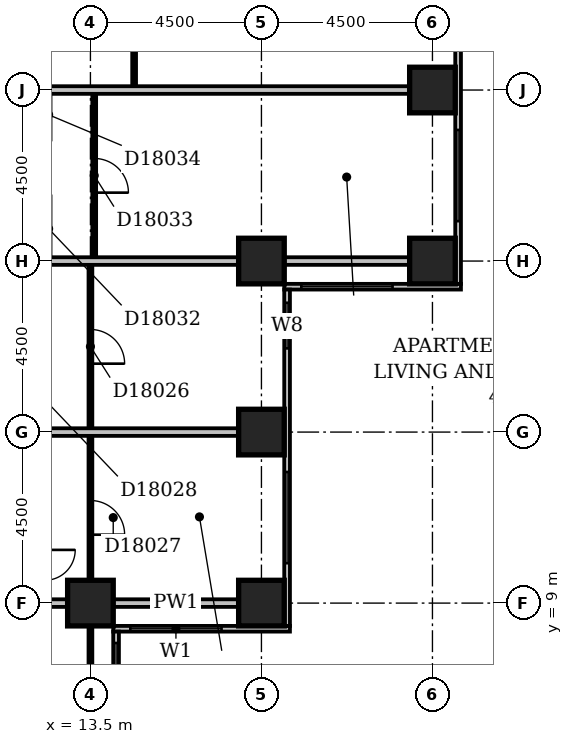
"""IFC4 building model, lengths in metres.
Left out: names, types, materials, properties, quantities, classifications, styles, units other than length and angle.
Written with IfcOpenShell. Run it as: python <this file> out.ifc"""

import sys

from ifc_helpers import new_model, si_unit, direction, frame, frame_2d, origin, origin_2d, place, context, subcontext, project, spatial, rectangle, extrude, element, fill, save


model = new_model("IFC4")
c1 = context("Model", 3, precision=1e-05, world=origin(), true_north=direction((0.0, 1.0)))
c2 = subcontext(c1, "Body", "Model", "MODEL_VIEW")
j1 = project(units=[si_unit("LENGTHUNIT", "METRE"), si_unit("PLANEANGLEUNIT", "RADIAN")], contexts=[c1])
p1 = place(None, origin())
s1 = spatial("IfcSite", under=j1, at=p1, CompositionType="ELEMENT")
p2 = place(p1, origin())
s2 = spatial("IfcBuilding", under=s1, at=p2, CompositionType="ELEMENT")
p3 = place(p2, frame((0.0, 0.0, 75.8)))
s3 = spatial("IfcBuildingStorey", under=s2, at=p3, CompositionType="ELEMENT", Elevation=75.8)
for number, where, z_axis, x_axis in (
    (1, (13.5, 9.0, -0.3), (0.0, 0.0, 1.0), (1.0, 0.0, 0.0)),
    (2, (18.0, 9.0, -0.3), (0.0, 0.0, 1.0), (1.0, 0.0, 0.0)),
    (3, (18.0, 13.5, -0.3), (0.0, 0.0, 1.0), (1.0, 0.0, 0.0)),
    (4, (18.0, 18.0, -0.3), (0.0, 0.0, 1.0), (1.0, 0.0, 0.0)),
    (5, (22.5, 18.0, -0.3), (0.0, 0.0, 1.0), (1.0, 0.0, 0.0)),
    (6, (22.5, 22.5, -0.3), (0.0, 0.0, 1.0), (1.0, 0.0, 0.0)),
):
    element("IfcColumn", number, at=place(p3, frame(where, z_axis=z_axis, x_axis=x_axis)), inside=s3, PredefinedType="COLUMN", context=c2, shape_type="SweptSolid", body=[
        extrude(rectangle(XDim=1.2, YDim=1.2, at=origin_2d()), origin(), (0.0, 0.0, 1.0), 3.6),
    ])
p4 = place(p3, frame((14.175, 3.9, 0.0), z_axis=(0.0, 0.0, 1.0), x_axis=(0.0, 1.0, 0.0)))
e7 = element("IfcWall", 7, at=p4, inside=s3, PredefinedType="STANDARD", context=c2, shape_type="SweptSolid", body=[
    extrude(rectangle(XDim=4.35, YDim=0.15, at=frame_2d((2.175, 0.0))), origin(), (0.0, 0.0, 1.0), 2.7),
])
p5 = place(p4, frame((1.65, 0.0, 0.6)))
e8 = element("IfcOpeningElement", 8, at=p5, cuts=e7, PredefinedType="OPENING", context=c2, shape_type="SweptSolid", body=[
    extrude(rectangle(XDim=2.4, YDim=1.8, at=frame_2d((1.2, 0.9))), frame((0.0, 0.087, 0.0), z_axis=(0.0, -1.0, 0.0), x_axis=(1.0, 0.0, 0.0)), (0.0, 0.0, 1.0), 0.174),
])
p6 = place(p3, frame((14.1, 8.325, 0.0), z_axis=(0.0, 0.0, 1.0), x_axis=(1.0, 0.0, 0.0)))
e9 = element("IfcWall", 9, at=p6, inside=s3, PredefinedType="STANDARD", context=c2, shape_type="SweptSolid", body=[
    extrude(rectangle(XDim=4.65, YDim=0.15, at=frame_2d((2.325, 0.0))), origin(), (0.0, 0.0, 1.0), 2.7),
])
p7 = place(p6, frame((0.45, 0.0, 0.6)))
e10 = element("IfcOpeningElement", 10, at=p7, cuts=e9, PredefinedType="OPENING", context=c2, shape_type="SweptSolid", body=[
    extrude(rectangle(XDim=2.4, YDim=1.8, at=frame_2d((1.2, 0.9))), frame((0.0, 0.087, 0.0), z_axis=(0.0, -1.0, 0.0), x_axis=(1.0, 0.0, 0.0)), (0.0, 0.0, 1.0), 0.174),
])
p8 = place(p3, frame((18.675, 8.4, 0.0), z_axis=(0.0, 0.0, 1.0), x_axis=(0.0, 1.0, 0.0)))
e11 = element("IfcWall", 11, at=p8, inside=s3, PredefinedType="STANDARD", context=c2, shape_type="SweptSolid", body=[
    extrude(rectangle(XDim=8.85, YDim=0.15, at=frame_2d((4.425, 0.0))), origin(), (0.0, 0.0, 1.0), 2.7),
])
p9 = place(p8, frame((1.65, 0.0, 0.6)))
e12 = element("IfcOpeningElement", 12, at=p9, cuts=e11, PredefinedType="OPENING", context=c2, shape_type="SweptSolid", body=[
    extrude(rectangle(XDim=2.4, YDim=1.8, at=frame_2d((1.2, 0.9))), frame((0.0, 0.087, 0.0), z_axis=(0.0, -1.0, 0.0), x_axis=(1.0, 0.0, 0.0)), (0.0, 0.0, 1.0), 0.174),
])
p10 = place(p8, frame((7.302, 0.0, 0.6)))
e13 = element("IfcOpeningElement", 13, at=p10, cuts=e11, PredefinedType="OPENING", context=c2, shape_type="SweptSolid", body=[
    extrude(rectangle(XDim=1.2, YDim=1.8, at=frame_2d((0.6, 0.9))), frame((0.0, 0.087, 0.0), z_axis=(0.0, -1.0, 0.0), x_axis=(1.0, 0.0, 0.0)), (0.0, 0.0, 1.0), 0.174),
])
p11 = place(p3, frame((18.6, 17.325, 0.0), z_axis=(0.0, 0.0, 1.0), x_axis=(1.0, 0.0, 0.0)))
e14 = element("IfcWall", 14, at=p11, inside=s3, PredefinedType="STANDARD", context=c2, shape_type="SweptSolid", body=[
    extrude(rectangle(XDim=4.65, YDim=0.15, at=frame_2d((2.325, 0.0))), origin(), (0.0, 0.0, 1.0), 2.7),
])
p12 = place(p11, frame((0.45, 0.0, 0.6)))
e15 = element("IfcOpeningElement", 15, at=p12, cuts=e14, PredefinedType="OPENING", context=c2, shape_type="SweptSolid", body=[
    extrude(rectangle(XDim=2.4, YDim=1.8, at=frame_2d((1.2, 0.9))), frame((0.0, 0.087, 0.0), z_axis=(0.0, -1.0, 0.0), x_axis=(1.0, 0.0, 0.0)), (0.0, 0.0, 1.0), 0.174),
])
p13 = place(p3, frame((23.175, 17.4, 0.0), z_axis=(0.0, 0.0, 1.0), x_axis=(0.0, 1.0, 0.0)))
e16 = element("IfcWall", 16, at=p13, inside=s3, PredefinedType="STANDARD", context=c2, shape_type="SweptSolid", body=[
    extrude(rectangle(XDim=17.85, YDim=0.15, at=frame_2d((8.925, 0.0))), origin(), (0.0, 0.0, 1.0), 2.7),
])
p14 = place(p13, frame((1.65, 0.0, 0.6)))
e17 = element("IfcOpeningElement", 17, at=p14, cuts=e16, PredefinedType="OPENING", context=c2, shape_type="SweptSolid", body=[
    extrude(rectangle(XDim=2.4, YDim=1.8, at=frame_2d((1.2, 0.9))), frame((0.0, 0.087, 0.0), z_axis=(0.0, -1.0, 0.0), x_axis=(1.0, 0.0, 0.0)), (0.0, 0.0, 1.0), 0.174),
])
p15 = place(p13, frame((6.15, 0.0, 0.6)))
e18 = element("IfcOpeningElement", 18, at=p15, cuts=e16, PredefinedType="OPENING", context=c2, shape_type="SweptSolid", body=[
    extrude(rectangle(XDim=2.4, YDim=1.8, at=frame_2d((1.2, 0.9))), frame((0.0, 0.087, 0.0), z_axis=(0.0, -1.0, 0.0), x_axis=(1.0, 0.0, 0.0)), (0.0, 0.0, 1.0), 0.174),
])
p16 = place(p13, frame((10.483, 0.0, 0.6)))
e19 = element("IfcOpeningElement", 19, at=p16, cuts=e16, PredefinedType="OPENING", context=c2, shape_type="SweptSolid", body=[
    extrude(rectangle(XDim=1.5, YDim=1.8, at=frame_2d((0.75, 0.9))), frame((0.0, 0.087, 0.0), z_axis=(0.0, -1.0, 0.0), x_axis=(1.0, 0.0, 0.0)), (0.0, 0.0, 1.0), 0.174),
])
p17 = place(p13, frame((15.15, 0.0, 0.6)))
e20 = element("IfcOpeningElement", 20, at=p17, cuts=e16, PredefinedType="OPENING", context=c2, shape_type="SweptSolid", body=[
    extrude(rectangle(XDim=2.4, YDim=1.8, at=frame_2d((1.2, 0.9))), frame((0.0, 0.087, 0.0), z_axis=(0.0, -1.0, 0.0), x_axis=(1.0, 0.0, 0.0)), (0.0, 0.0, 1.0), 0.174),
])
p18 = place(p3, frame((13.5, 5.1, 0.0), z_axis=(0.0, 0.0, 1.0), x_axis=(0.0, 1.0, 0.0)))
e21 = element("IfcWall", 21, at=p18, inside=s3, PredefinedType="PARTITIONING", context=c2, shape_type="SweptSolid", body=[
    extrude(rectangle(XDim=3.3, YDim=0.1, at=frame_2d((1.65, 0.0))), origin(), (0.0, 0.0, 1.0), 2.7),
])
p19 = place(p3, frame((9.1, 9.0, 0.0), z_axis=(0.0, 0.0, 1.0), x_axis=(1.0, 0.0, 0.0)))
e22 = element("IfcWall", 22, at=p19, inside=s3, PredefinedType="PARTITIONING", context=c2, shape_type="SweptSolid", body=[
    extrude(rectangle(XDim=3.8, YDim=0.2, at=frame_2d((1.9, 0.0))), origin(), (0.0, 0.0, 1.0), 3.3),
])
p20 = place(p3, frame((14.1, 9.0, 0.0), z_axis=(0.0, 0.0, 1.0), x_axis=(1.0, 0.0, 0.0)))
e23 = element("IfcWall", 23, at=p20, inside=s3, PredefinedType="PARTITIONING", context=c2, shape_type="SweptSolid", body=[
    extrude(rectangle(XDim=3.3, YDim=0.2, at=frame_2d((1.65, 0.0))), origin(), (0.0, 0.0, 1.0), 2.7),
])
p21 = place(p3, frame((13.5, 9.6, 0.0), z_axis=(0.0, 0.0, 1.0), x_axis=(0.0, 1.0, 0.0)))
e24 = element("IfcWall", 24, at=p21, inside=s3, PredefinedType="PARTITIONING", context=c2, shape_type="SweptSolid", body=[
    extrude(rectangle(XDim=8.3, YDim=0.1, at=frame_2d((4.15, 0.0))), origin(), (0.0, 0.0, 1.0), 3.3),
])
p22 = place(p21, frame((5.7, 0.0, 0.0)))
e25 = element("IfcOpeningElement", 25, at=p22, cuts=e24, PredefinedType="OPENING", context=c2, shape_type="SweptSolid", body=[
    extrude(rectangle(XDim=0.9, YDim=2.1, at=frame_2d((0.45, 1.05))), frame((0.0, 0.062, 0.0), z_axis=(0.0, -1.0, 0.0), x_axis=(1.0, 0.0, 0.0)), (0.0, 0.0, 1.0), 0.124),
])
p23 = place(p21, frame((1.2, 0.0, 0.0)))
e26 = element("IfcOpeningElement", 26, at=p23, cuts=e24, PredefinedType="OPENING", context=c2, shape_type="SweptSolid", body=[
    extrude(rectangle(XDim=0.9, YDim=2.1, at=frame_2d((0.45, 1.05))), frame((0.0, 0.062, 0.0), z_axis=(0.0, -1.0, 0.0), x_axis=(1.0, 0.0, 0.0)), (0.0, 0.0, 1.0), 0.124),
])
p24 = place(p3, frame((9.1, 13.5, 0.0), z_axis=(0.0, 0.0, 1.0), x_axis=(1.0, 0.0, 0.0)))
e27 = element("IfcWall", 27, at=p24, inside=s3, PredefinedType="PARTITIONING", context=c2, shape_type="SweptSolid", body=[
    extrude(rectangle(XDim=8.3, YDim=0.2, at=frame_2d((4.15, 0.0))), origin(), (0.0, 0.0, 1.0), 3.3),
])
p25 = place(p3, frame((9.1, 18.0, 0.0), z_axis=(0.0, 0.0, 1.0), x_axis=(1.0, 0.0, 0.0)))
e28 = element("IfcWall", 28, at=p25, inside=s3, PredefinedType="PARTITIONING", context=c2, shape_type="SweptSolid", body=[
    extrude(rectangle(XDim=8.3, YDim=0.2, at=frame_2d((4.15, 0.0))), origin(), (0.0, 0.0, 1.0), 2.6),
])
p26 = place(p3, frame((18.6, 18.0, 0.0), z_axis=(0.0, 0.0, 1.0), x_axis=(1.0, 0.0, 0.0)))
e29 = element("IfcWall", 29, at=p26, inside=s3, PredefinedType="PARTITIONING", context=c2, shape_type="SweptSolid", body=[
    extrude(rectangle(XDim=3.3, YDim=0.2, at=frame_2d((1.65, 0.0))), origin(), (0.0, 0.0, 1.0), 2.7),
])
p27 = place(p3, frame((13.6, 18.1, 0.0), z_axis=(0.0, 0.0, 1.0), x_axis=(0.0, 1.0, 0.0)))
e30 = element("IfcWall", 30, at=p27, inside=s3, PredefinedType="PARTITIONING", context=c2, shape_type="SweptSolid", body=[
    extrude(rectangle(XDim=4.3, YDim=0.1, at=frame_2d((2.15, 0.0))), origin(), (0.0, 0.0, 1.0), 3.3),
])
p28 = place(p27, frame((1.7, 0.0, 0.0)))
e31 = element("IfcOpeningElement", 31, at=p28, cuts=e30, PredefinedType="OPENING", context=c2, shape_type="SweptSolid", body=[
    extrude(rectangle(XDim=0.9, YDim=2.1, at=frame_2d((0.45, 1.05))), frame((0.0, 0.062, 0.0), z_axis=(0.0, -1.0, 0.0), x_axis=(1.0, 0.0, 0.0)), (0.0, 0.0, 1.0), 0.124),
])
p29 = place(p3, frame((9.1, 22.5, 0.0), z_axis=(0.0, 0.0, 1.0), x_axis=(1.0, 0.0, 0.0)))
e32 = element("IfcWall", 32, at=p29, inside=s3, PredefinedType="PARTITIONING", context=c2, shape_type="SweptSolid", body=[
    extrude(rectangle(XDim=12.8, YDim=0.2, at=frame_2d((6.4, 0.0))), origin(), (0.0, 0.0, 1.0), 3.3),
])
p30 = place(p3, frame((14.65, 22.6, 0.0), z_axis=(0.0, 0.0, 1.0), x_axis=(0.0, 1.0, 0.0)))
e33 = element("IfcWall", 33, at=p30, inside=s3, PredefinedType="PARTITIONING", context=c2, shape_type="SweptSolid", body=[
    extrude(rectangle(XDim=13.3, YDim=0.1, at=frame_2d((6.65, 0.0))), origin(), (0.0, 0.0, 1.0), 3.3),
])
p31 = place(p30, frame((1.7, 0.0, 0.0)))
e34 = element("IfcOpeningElement", 34, at=p31, cuts=e33, PredefinedType="OPENING", context=c2, shape_type="SweptSolid", body=[
    extrude(rectangle(XDim=0.9, YDim=2.1, at=frame_2d((0.45, 1.05))), frame((0.0, 0.062, 0.0), z_axis=(0.0, -1.0, 0.0), x_axis=(1.0, 0.0, 0.0)), (0.0, 0.0, 1.0), 0.124),
])
p32 = place(p30, frame((6.2, 0.0, 0.0)))
e35 = element("IfcOpeningElement", 35, at=p32, cuts=e33, PredefinedType="OPENING", context=c2, shape_type="SweptSolid", body=[
    extrude(rectangle(XDim=0.9, YDim=2.1, at=frame_2d((0.45, 1.05))), frame((0.0, 0.062, 0.0), z_axis=(0.0, -1.0, 0.0), x_axis=(1.0, 0.0, 0.0)), (0.0, 0.0, 1.0), 0.124),
])
p33 = place(p30, frame((10.7, 0.0, 0.0)))
e36 = element("IfcOpeningElement", 36, at=p33, cuts=e33, PredefinedType="OPENING", context=c2, shape_type="SweptSolid", body=[
    extrude(rectangle(XDim=0.9, YDim=2.1, at=frame_2d((0.45, 1.05))), frame((0.0, 0.062, 0.0), z_axis=(0.0, -1.0, 0.0), x_axis=(1.0, 0.0, 0.0)), (0.0, 0.0, 1.0), 0.124),
])
p34 = place(p5, origin())
e37 = element("IfcWindow", 37, at=p34, inside=s3, PartitioningType="SINGLE_PANEL", PredefinedType="WINDOW", context=c2, shape_type="SweptSolid", body=[
    extrude(rectangle(XDim=2.4, YDim=1.8, at=frame_2d((1.2, 0.9))), frame((0.0, 0.03, 0.0), z_axis=(0.0, -1.0, 0.0), x_axis=(1.0, 0.0, 0.0)), (0.0, 0.0, 1.0), 0.06),
])
fill(e8, e37)
p35 = place(p7, origin())
e38 = element("IfcWindow", 38, at=p35, inside=s3, PartitioningType="SINGLE_PANEL", PredefinedType="WINDOW", context=c2, shape_type="SweptSolid", body=[
    extrude(rectangle(XDim=2.4, YDim=1.8, at=frame_2d((1.2, 0.9))), frame((0.0, 0.03, 0.0), z_axis=(0.0, -1.0, 0.0), x_axis=(1.0, 0.0, 0.0)), (0.0, 0.0, 1.0), 0.06),
])
fill(e10, e38)
p36 = place(p9, origin())
e39 = element("IfcWindow", 39, at=p36, inside=s3, PartitioningType="SINGLE_PANEL", PredefinedType="WINDOW", context=c2, shape_type="SweptSolid", body=[
    extrude(rectangle(XDim=2.4, YDim=1.8, at=frame_2d((1.2, 0.9))), frame((0.0, 0.03, 0.0), z_axis=(0.0, -1.0, 0.0), x_axis=(1.0, 0.0, 0.0)), (0.0, 0.0, 1.0), 0.06),
])
fill(e12, e39)
p37 = place(p10, origin())
e40 = element("IfcWindow", 40, at=p37, inside=s3, PartitioningType="SINGLE_PANEL", PredefinedType="WINDOW", context=c2, shape_type="SweptSolid", body=[
    extrude(rectangle(XDim=1.2, YDim=1.8, at=frame_2d((0.6, 0.9))), frame((0.0, 0.03, 0.0), z_axis=(0.0, -1.0, 0.0), x_axis=(1.0, 0.0, 0.0)), (0.0, 0.0, 1.0), 0.06),
])
fill(e13, e40)
p38 = place(p12, origin())
e41 = element("IfcWindow", 41, at=p38, inside=s3, PartitioningType="SINGLE_PANEL", PredefinedType="WINDOW", context=c2, shape_type="SweptSolid", body=[
    extrude(rectangle(XDim=2.4, YDim=1.8, at=frame_2d((1.2, 0.9))), frame((0.0, 0.03, 0.0), z_axis=(0.0, -1.0, 0.0), x_axis=(1.0, 0.0, 0.0)), (0.0, 0.0, 1.0), 0.06),
])
fill(e15, e41)
p39 = place(p14, origin())
e42 = element("IfcWindow", 42, at=p39, inside=s3, PartitioningType="SINGLE_PANEL", PredefinedType="WINDOW", context=c2, shape_type="SweptSolid", body=[
    extrude(rectangle(XDim=2.4, YDim=1.8, at=frame_2d((1.2, 0.9))), frame((0.0, 0.03, 0.0), z_axis=(0.0, -1.0, 0.0), x_axis=(1.0, 0.0, 0.0)), (0.0, 0.0, 1.0), 0.06),
])
fill(e17, e42)
p40 = place(p22, frame((0.9, 0.0, 0.0), z_axis=(0.0, 0.0, 1.0), x_axis=(-1.0, 0.0, 0.0)))
e43 = element("IfcDoor", 43, at=p40, inside=s3, OperationType="SINGLE_SWING_RIGHT", PredefinedType="DOOR", context=c2, shape_type="SweptSolid", body=[
    extrude(rectangle(XDim=0.9, YDim=2.1, at=frame_2d((0.45, 1.05))), frame((0.0, 0.025, 0.0), z_axis=(0.0, -1.0, 0.0), x_axis=(1.0, 0.0, 0.0)), (0.0, 0.0, 1.0), 0.05),
])
fill(e25, e43)
p41 = place(p23, frame((0.9, 0.0, 0.0), z_axis=(0.0, 0.0, 1.0), x_axis=(-1.0, 0.0, 0.0)))
e44 = element("IfcDoor", 44, at=p41, inside=s3, OperationType="SINGLE_SWING_RIGHT", PredefinedType="DOOR", context=c2, shape_type="SweptSolid", body=[
    extrude(rectangle(XDim=0.9, YDim=2.1, at=frame_2d((0.45, 1.05))), frame((0.0, 0.025, 0.0), z_axis=(0.0, -1.0, 0.0), x_axis=(1.0, 0.0, 0.0)), (0.0, 0.0, 1.0), 0.05),
])
fill(e26, e44)
p42 = place(p28, frame((0.9, 0.0, 0.0), z_axis=(0.0, 0.0, 1.0), x_axis=(-1.0, 0.0, 0.0)))
e45 = element("IfcDoor", 45, at=p42, inside=s3, OperationType="SINGLE_SWING_RIGHT", PredefinedType="DOOR", context=c2, shape_type="SweptSolid", body=[
    extrude(rectangle(XDim=0.9, YDim=2.1, at=frame_2d((0.45, 1.05))), frame((0.0, 0.025, 0.0), z_axis=(0.0, -1.0, 0.0), x_axis=(1.0, 0.0, 0.0)), (0.0, 0.0, 1.0), 0.05),
])
fill(e31, e45)
save(model, sys.argv[1])
